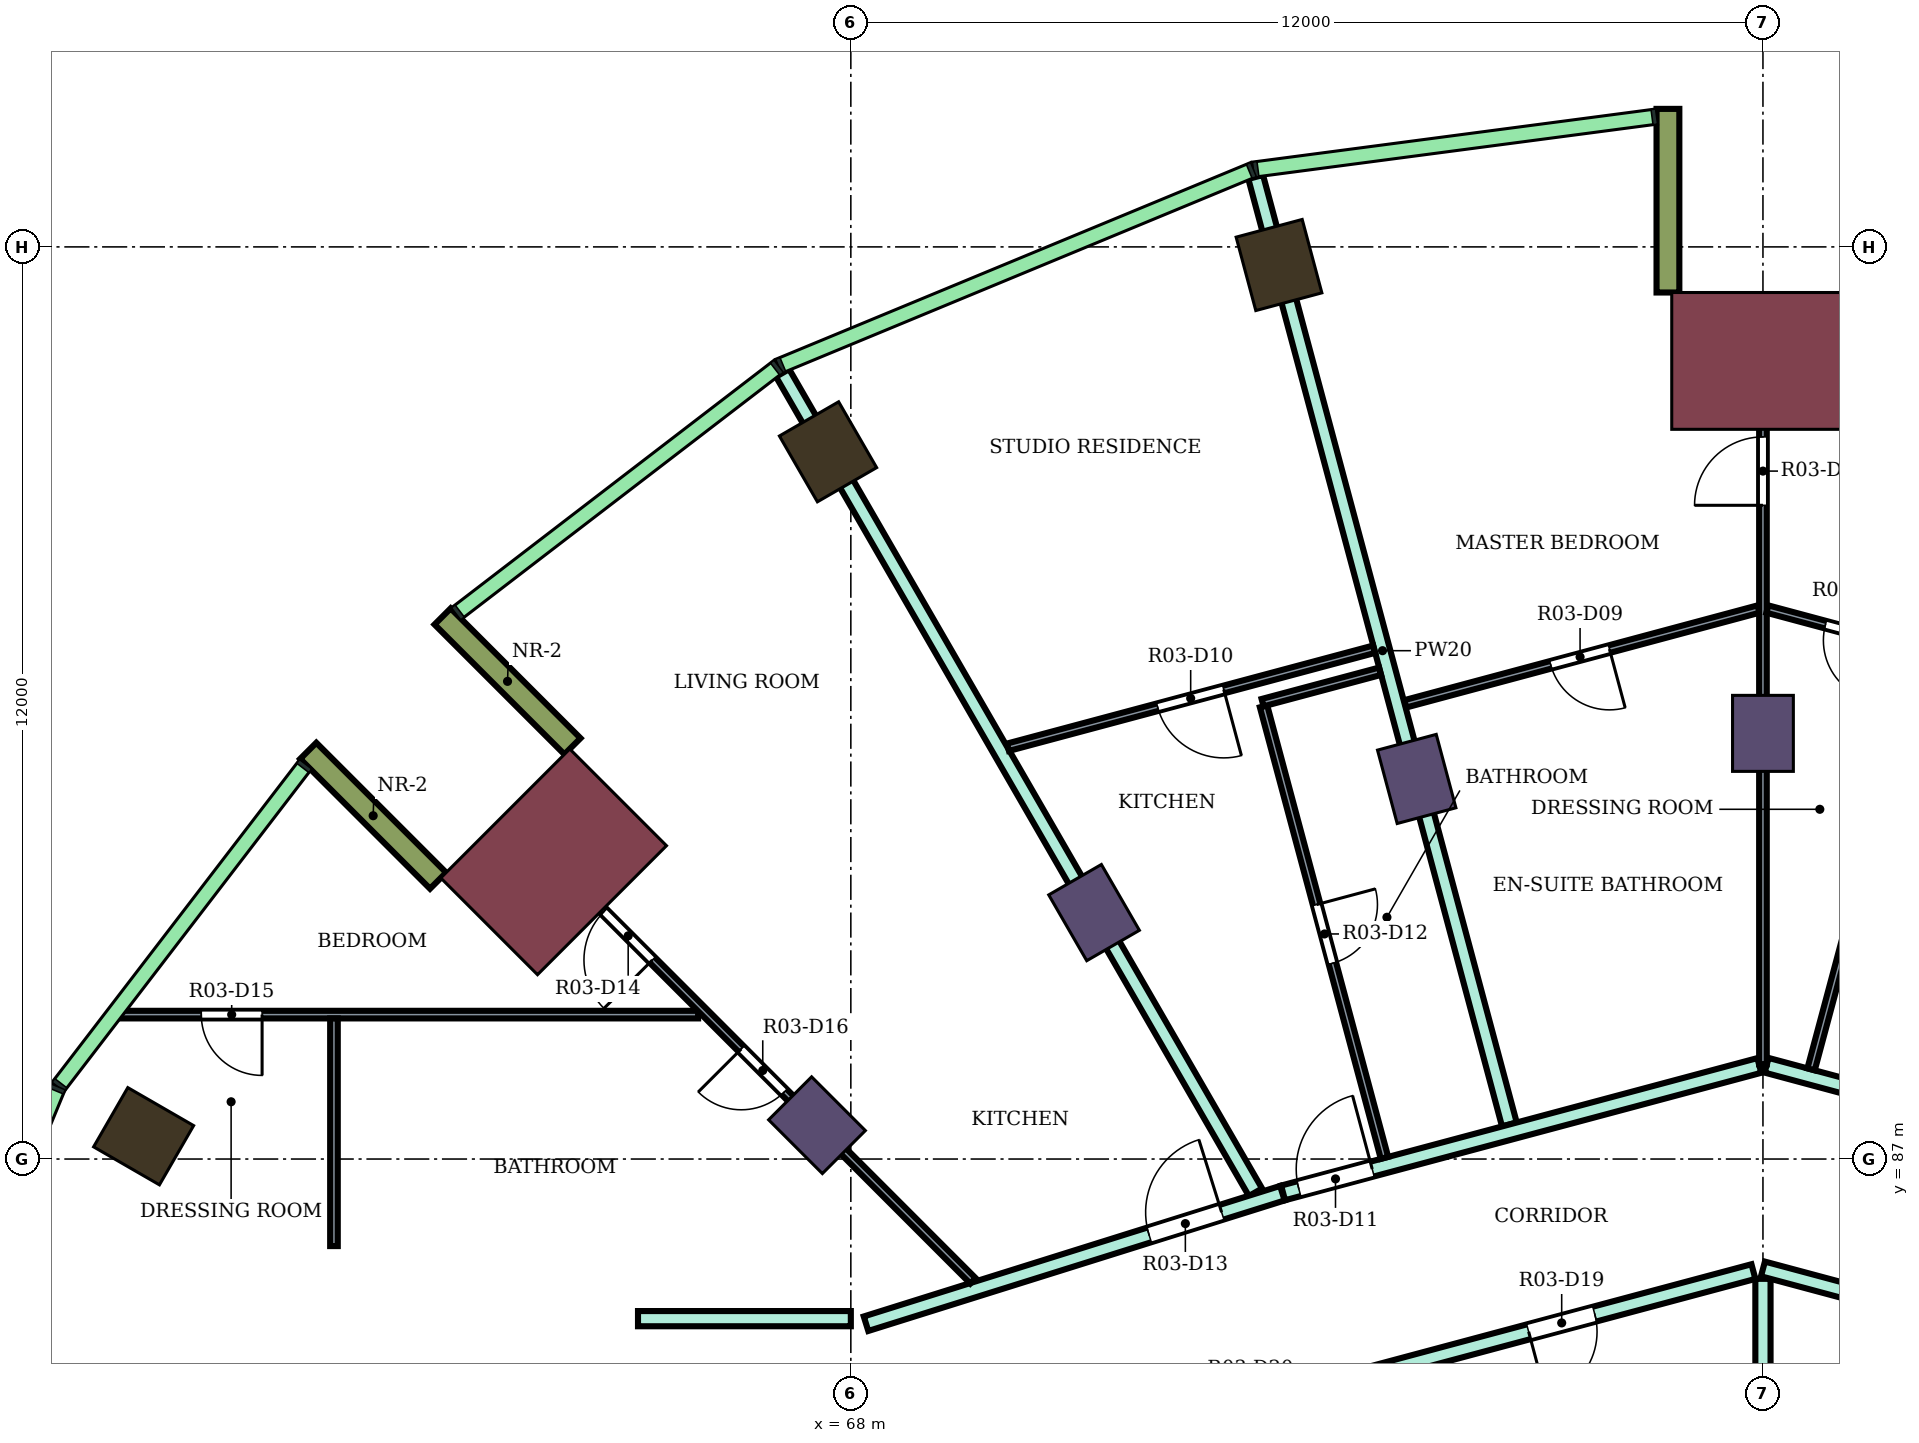
"""IFC4 building model, lengths in metres.
Left out: names, types, materials, properties, quantities, classifications, styles, units other than length and angle.
Written with IfcOpenShell. Run it as: python <this file> out.ifc"""

import sys

from ifc_helpers import new_model, si_unit, direction, frame, frame_2d, origin, origin_2d, place, context, subcontext, project, spatial, rectangle, extrude, element, fill, save


model = new_model("IFC4")
c1 = context("Model", 3, precision=1e-05, world=origin(), true_north=direction((0.0, 1.0)))
c2 = subcontext(c1, "Body", "Model", "MODEL_VIEW")
j1 = project(units=[si_unit("LENGTHUNIT", "METRE"), si_unit("PLANEANGLEUNIT", "RADIAN")], contexts=[c1])
p1 = place(None, origin())
s1 = spatial("IfcSite", under=j1, at=p1, CompositionType="ELEMENT")
p2 = place(p1, origin())
s2 = spatial("IfcBuilding", under=s1, at=p2, CompositionType="ELEMENT")
p3 = place(p2, frame((0.0, 0.0, 182.3)))
s3 = spatial("IfcBuildingStorey", under=s2, at=p3, CompositionType="ELEMENT", Elevation=182.3)
for number, where, z_axis, x_axis in (
    (1, (73.633, 98.762, 0.0), (0.0, 0.0, 1.0), (-0.259, 0.966, 0.0)),
    (2, (67.7, 96.304, 0.0), (0.0, 0.0, 1.0), (-0.5, 0.866, 0.0)),
    (3, (58.696, 87.3, 0.0), (0.0, 0.0, 1.0), (-0.866, 0.5, 0.0)),
):
    element("IfcColumn", number, at=place(p3, frame(where, z_axis=z_axis, x_axis=x_axis)), inside=s3, PredefinedType="COLUMN", context=c2, shape_type="SweptSolid", body=[
        extrude(rectangle(XDim=1.0, YDim=0.9, at=origin_2d()), origin(), (0.0, 0.0, 1.0), 4.1),
    ])
for number, where, z_axis, x_axis in (
    (4, (80.0, 92.6, 0.0), (0.0, 0.0, 1.0), (0.0, 1.0, 0.0)),
    (5, (75.445, 92.0, 0.0), (0.0, 0.0, 1.0), (-0.259, 0.966, 0.0)),
    (6, (71.2, 90.242, 0.0), (0.0, 0.0, 1.0), (-0.5, 0.866, 0.0)),
    (7, (67.555, 87.445, 0.0), (0.0, 0.0, 1.0), (-0.707, 0.707, 0.0)),
):
    element("IfcColumn", number, at=place(p3, frame(where, z_axis=z_axis, x_axis=x_axis)), inside=s3, PredefinedType="COLUMN", context=c2, shape_type="SweptSolid", body=[
        extrude(rectangle(XDim=1.0, YDim=0.8, at=origin_2d()), origin(), (0.0, 0.0, 1.0), 4.1),
    ])
for number, where, z_axis, x_axis in (
    (8, (80.0, 97.5, 0.0), (0.0, 0.0, 1.0), (0.0, 1.0, 0.0)),
    (9, (64.09, 90.91, 0.0), (0.0, 0.0, 1.0), (-0.707, 0.707, 0.0)),
):
    element("IfcColumn", number, at=place(p3, frame(where, z_axis=z_axis, x_axis=x_axis)), inside=s3, PredefinedType="COLUMN", context=c2, shape_type="SweptSolid", body=[
        extrude(rectangle(XDim=1.8, YDim=2.4, at=origin_2d()), origin(), (0.0, 0.0, 1.0), 4.1),
    ])
for number, where, z_axis, x_axis in (
    (10, (78.75, 98.4, 0.0), (0.0, 0.0, 1.0), (0.0, 1.0, 0.0)),
    (11, (64.338, 92.43, 0.0), (0.0, 0.0, 1.0), (-0.707, 0.707, 0.0)),
    (12, (62.57, 90.662, 0.0), (0.0, 0.0, 1.0), (-0.707, 0.707, 0.0)),
):
    element("IfcWall", number, at=place(p3, frame(where, z_axis=z_axis, x_axis=x_axis)), inside=s3, PredefinedType="NOTDEFINED", context=c2, shape_type="SweptSolid", body=[
        extrude(rectangle(XDim=2.416, YDim=0.3, at=frame_2d((1.208, 0.0))), origin(), (0.0, 0.0, 1.0), 4.1),
    ])
p4 = place(p3, frame((65.2, 84.9, 0.0), z_axis=(0.0, 0.0, 1.0), x_axis=(1.0, 0.0, 0.0)))
e13 = element("IfcWall", 13, at=p4, inside=s3, PredefinedType="PARTITIONING", context=c2, shape_type="SweptSolid", body=[
    extrude(rectangle(XDim=2.8, YDim=0.2, at=frame_2d((1.4, 0.0))), origin(), (0.0, 0.0, 1.0), 3.65),
])
p5 = place(p3, frame((67.102, 97.342, 0.0), z_axis=(0.0, 0.0, 1.0), x_axis=(0.499940938316, -0.866059500378, 0.0)))
e14 = element("IfcWall", 14, at=p5, inside=s3, PredefinedType="PARTITIONING", context=c2, shape_type="SweptSolid", body=[
    extrude(rectangle(XDim=12.446, YDim=0.2, at=frame_2d((6.223, 0.0))), origin(), (0.0, 0.0, 1.0), 3.65),
])
p6 = place(p3, frame((68.2, 84.833, 0.0), z_axis=(0.0, 0.0, 1.0), x_axis=(0.954204109499, 0.299156342762, 0.0)))
e15 = element("IfcWall", 15, at=p6, inside=s3, PredefinedType="PARTITIONING", context=c2, shape_type="SweptSolid", body=[
    extrude(rectangle(XDim=5.74, YDim=0.2, at=frame_2d((2.87, 0.0))), origin(), (0.0, 0.0, 1.0), 3.65),
])
p7 = place(p6, frame((3.903, 0.0, 0.0)))
e16 = element("IfcOpeningElement", 16, at=p7, cuts=e15, PredefinedType="OPENING", context=c2, shape_type="SweptSolid", body=[
    extrude(rectangle(XDim=1.0, YDim=2.1, at=frame_2d((0.5, 1.05))), frame((0.0, 0.11, 0.0), z_axis=(0.0, -1.0, 0.0), x_axis=(1.0, 0.0, 0.0)), (0.0, 0.0, 1.0), 0.22),
])
p8 = place(p3, frame((73.326, 99.92, 0.0), z_axis=(0.0, 0.0, 1.0), x_axis=(0.258652861824, -0.965970339643, 0.0)))
e17 = element("IfcWall", 17, at=p8, inside=s3, PredefinedType="PARTITIONING", context=c2, shape_type="SweptSolid", body=[
    extrude(rectangle(XDim=12.904, YDim=0.2, at=frame_2d((6.452, 0.0))), origin(), (0.0, 0.0, 1.0), 3.65),
])
p9 = place(p3, frame((73.687, 86.554, 0.0), z_axis=(0.0, 0.0, 1.0), x_axis=(0.965992724769, 0.258569247387, 0.0)))
e18 = element("IfcWall", 18, at=p9, inside=s3, PredefinedType="PARTITIONING", context=c2, shape_type="SweptSolid", body=[
    extrude(rectangle(XDim=6.486, YDim=0.2, at=frame_2d((3.243, 0.0))), origin(), (0.0, 0.0, 1.0), 3.65),
])
p10 = place(p9, frame((0.214, 0.0, 0.0)))
e19 = element("IfcOpeningElement", 19, at=p10, cuts=e18, PredefinedType="OPENING", context=c2, shape_type="SweptSolid", body=[
    extrude(rectangle(XDim=1.0, YDim=2.1, at=frame_2d((0.5, 1.05))), frame((0.0, 0.11, 0.0), z_axis=(0.0, -1.0, 0.0), x_axis=(1.0, 0.0, 0.0)), (0.0, 0.0, 1.0), 0.22),
])
p11 = place(p3, frame((74.413, 84.057, 0.0), z_axis=(0.0, 0.0, 1.0), x_axis=(0.965972135939, 0.258646153246, 0.0)))
e20 = element("IfcWall", 20, at=p11, inside=s3, PredefinedType="PARTITIONING", context=c2, shape_type="SweptSolid", body=[
    extrude(rectangle(XDim=5.654, YDim=0.2, at=frame_2d((2.827, 0.0))), origin(), (0.0, 0.0, 1.0), 3.65),
])
p12 = place(p11, frame((2.593, 0.0, 0.0)))
e21 = element("IfcOpeningElement", 21, at=p12, cuts=e20, PredefinedType="OPENING", context=c2, shape_type="SweptSolid", body=[
    extrude(rectangle(XDim=0.9, YDim=2.1, at=frame_2d((0.45, 1.05))), frame((0.0, 0.11, 0.0), z_axis=(0.0, -1.0, 0.0), x_axis=(1.0, 0.0, 0.0)), (0.0, 0.0, 1.0), 0.22),
])
p13 = place(p3, frame((80.0, 82.699, 0.0), z_axis=(0.0, 0.0, 1.0), x_axis=(0.0, 1.0, 0.0)))
e22 = element("IfcWall", 22, at=p13, inside=s3, PredefinedType="PARTITIONING", context=c2, shape_type="SweptSolid", body=[
    extrude(rectangle(XDim=2.725, YDim=0.2, at=frame_2d((1.363, 0.0))), origin(), (0.0, 0.0, 1.0), 3.65),
])
p14 = place(p3, frame((80.0, 85.554, 0.0), z_axis=(0.0, 0.0, 1.0), x_axis=(0.965928989968, -0.258807237802, 0.0)))
e23 = element("IfcWall", 23, at=p14, inside=s3, PredefinedType="PARTITIONING", context=c2, shape_type="SweptSolid", body=[
    extrude(rectangle(XDim=5.774, YDim=0.2, at=frame_2d((2.887, 0.0))), origin(), (0.0, 0.0, 1.0), 3.65),
])
p15 = place(p14, frame((2.292, 0.0, 0.0)))
e24 = element("IfcOpeningElement", 24, at=p15, cuts=e23, PredefinedType="OPENING", context=c2, shape_type="SweptSolid", body=[
    extrude(rectangle(XDim=0.9, YDim=2.1, at=frame_2d((0.45, 1.05))), frame((0.0, 0.11, 0.0), z_axis=(0.0, -1.0, 0.0), x_axis=(1.0, 0.0, 0.0)), (0.0, 0.0, 1.0), 0.22),
])
p16 = place(p3, frame((80.048, 88.233, 0.0), z_axis=(0.0, 0.0, 1.0), x_axis=(0.965787353661, -0.259335280109, 0.0)))
e25 = element("IfcWall", 25, at=p16, inside=s3, PredefinedType="PARTITIONING", context=c2, shape_type="SweptSolid", body=[
    extrude(rectangle(XDim=6.476, YDim=0.2, at=frame_2d((3.238, 0.0))), origin(), (0.0, 0.0, 1.0), 3.65),
])
p17 = place(p16, frame((4.936, 0.0, 0.0)))
e26 = element("IfcOpeningElement", 26, at=p17, cuts=e25, PredefinedType="OPENING", context=c2, shape_type="SweptSolid", body=[
    extrude(rectangle(XDim=1.0, YDim=2.1, at=frame_2d((0.5, 1.05))), frame((0.0, 0.11, 0.0), z_axis=(0.0, -1.0, 0.0), x_axis=(1.0, 0.0, 0.0)), (0.0, 0.0, 1.0), 0.22),
])
p18 = place(p3, frame((58.379, 88.9, 0.0), z_axis=(0.0, 0.0, 1.0), x_axis=(1.0, 0.0, 0.0)))
e27 = element("IfcWall", 27, at=p18, inside=s3, PredefinedType="PARTITIONING", context=c2, shape_type="SweptSolid", body=[
    extrude(rectangle(XDim=7.612, YDim=0.1, at=frame_2d((3.806, 0.0))), origin(), (0.0, 0.0, 1.0), 3.65),
])
p19 = place(p18, frame((1.075, 0.0, 0.0)))
e28 = element("IfcOpeningElement", 28, at=p19, cuts=e27, PredefinedType="OPENING", context=c2, shape_type="SweptSolid", body=[
    extrude(rectangle(XDim=0.8, YDim=2.1, at=frame_2d((0.4, 1.05))), frame((0.0, 0.06, 0.0), z_axis=(0.0, -1.0, 0.0), x_axis=(1.0, 0.0, 0.0)), (0.0, 0.0, 1.0), 0.12),
])
p20 = place(p3, frame((61.2, 85.855, 0.0), z_axis=(0.0, 0.0, 1.0), x_axis=(0.0, 1.0, 0.0)))
e29 = element("IfcWall", 29, at=p20, inside=s3, PredefinedType="PARTITIONING", context=c2, shape_type="SweptSolid", body=[
    extrude(rectangle(XDim=2.995, YDim=0.1, at=frame_2d((1.498, 0.0))), origin(), (0.0, 0.0, 1.0), 3.65),
])
p21 = place(p3, frame((63.599, 91.409, 0.0), z_axis=(0.0, 0.0, 1.0), x_axis=(0.706920044618, -0.707293468453, 0.0)))
e30 = element("IfcWall", 30, at=p21, inside=s3, PredefinedType="PARTITIONING", context=c2, shape_type="SweptSolid", body=[
    extrude(rectangle(XDim=8.499, YDim=0.1, at=frame_2d((4.25, 0.0))), origin(), (0.0, 0.0, 1.0), 3.65),
])
p22 = place(p21, frame((1.632, 0.0, 0.0)))
e31 = element("IfcOpeningElement", 31, at=p22, cuts=e30, PredefinedType="OPENING", context=c2, shape_type="SweptSolid", body=[
    extrude(rectangle(XDim=0.9, YDim=2.1, at=frame_2d((0.45, 1.05))), frame((0.0, 0.06, 0.0), z_axis=(0.0, -1.0, 0.0), x_axis=(1.0, 0.0, 0.0)), (0.0, 0.0, 1.0), 0.12),
])
p23 = place(p21, frame((4.186, 0.0, 0.0)))
e32 = element("IfcOpeningElement", 32, at=p23, cuts=e30, PredefinedType="OPENING", context=c2, shape_type="SweptSolid", body=[
    extrude(rectangle(XDim=0.8, YDim=2.1, at=frame_2d((0.4, 1.05))), frame((0.0, 0.06, 0.0), z_axis=(0.0, -1.0, 0.0), x_axis=(1.0, 0.0, 0.0)), (0.0, 0.0, 1.0), 0.12),
])
p24 = place(p3, frame((70.067, 92.417, 0.0), z_axis=(0.0, 0.0, 1.0), x_axis=(0.965982566978, 0.258607193045, 0.0)))
e33 = element("IfcWall", 33, at=p24, inside=s3, PredefinedType="PARTITIONING", context=c2, shape_type="SweptSolid", body=[
    extrude(rectangle(XDim=4.987, YDim=0.1, at=frame_2d((2.493, 0.0))), origin(), (0.0, 0.0, 1.0), 3.65),
])
p25 = place(p24, frame((2.038, 0.0, 0.0)))
e34 = element("IfcOpeningElement", 34, at=p25, cuts=e33, PredefinedType="OPENING", context=c2, shape_type="SweptSolid", body=[
    extrude(rectangle(XDim=0.9, YDim=2.1, at=frame_2d((0.45, 1.05))), frame((0.0, 0.06, 0.0), z_axis=(0.0, -1.0, 0.0), x_axis=(1.0, 0.0, 0.0)), (0.0, 0.0, 1.0), 0.12),
])
p26 = place(p3, frame((73.43, 92.956, 0.0), z_axis=(0.0, 0.0, 1.0), x_axis=(0.258707643808, -0.965955669291, 0.0)))
e35 = element("IfcWall", 35, at=p26, inside=s3, PredefinedType="PARTITIONING", context=c2, shape_type="SweptSolid", body=[
    extrude(rectangle(XDim=6.15, YDim=0.1, at=frame_2d((3.075, 0.0))), origin(), (0.0, 0.0, 1.0), 3.65),
])
p27 = place(p26, frame((2.7, 0.0, 0.0)))
e36 = element("IfcOpeningElement", 36, at=p27, cuts=e35, PredefinedType="OPENING", context=c2, shape_type="SweptSolid", body=[
    extrude(rectangle(XDim=0.8, YDim=2.1, at=frame_2d((0.4, 1.05))), frame((0.0, 0.06, 0.0), z_axis=(0.0, -1.0, 0.0), x_axis=(1.0, 0.0, 0.0)), (0.0, 0.0, 1.0), 0.12),
])
p28 = place(p3, frame((73.417, 93.004, 0.0), z_axis=(0.0, 0.0, 1.0), x_axis=(0.966062421459, 0.258308725839, 0.0)))
e37 = element("IfcWall", 37, at=p28, inside=s3, PredefinedType="PARTITIONING", context=c2, shape_type="SweptSolid", body=[
    extrude(rectangle(XDim=1.599, YDim=0.1, at=frame_2d((0.8, 0.0))), origin(), (0.0, 0.0, 1.0), 3.65),
])
p29 = place(p3, frame((75.295, 92.989, 0.0), z_axis=(0.0, 0.0, 1.0), x_axis=(0.965829517501, 0.259178207271, 0.0)))
e38 = element("IfcWall", 38, at=p29, inside=s3, PredefinedType="PARTITIONING", context=c2, shape_type="SweptSolid", body=[
    extrude(rectangle(XDim=4.812, YDim=0.1, at=frame_2d((2.406, 0.0))), origin(), (0.0, 0.0, 1.0), 3.65),
])
p30 = place(p29, frame((1.981, 0.0, 0.0)))
e39 = element("IfcOpeningElement", 39, at=p30, cuts=e38, PredefinedType="OPENING", context=c2, shape_type="SweptSolid", body=[
    extrude(rectangle(XDim=0.8, YDim=2.1, at=frame_2d((0.4, 1.05))), frame((0.0, 0.06, 0.0), z_axis=(0.0, -1.0, 0.0), x_axis=(1.0, 0.0, 0.0)), (0.0, 0.0, 1.0), 0.12),
])
p31 = place(p3, frame((80.0, 88.246, 0.0), z_axis=(0.0, 0.0, 1.0), x_axis=(0.0, 1.0, 0.0)))
e40 = element("IfcWall", 40, at=p31, inside=s3, PredefinedType="PARTITIONING", context=c2, shape_type="SweptSolid", body=[
    extrude(rectangle(XDim=9.954, YDim=0.1, at=frame_2d((4.977, 0.0))), origin(), (0.0, 0.0, 1.0), 3.65),
])
p32 = place(p31, frame((7.354, 0.0, 0.0)))
e41 = element("IfcOpeningElement", 41, at=p32, cuts=e40, PredefinedType="OPENING", context=c2, shape_type="SweptSolid", body=[
    extrude(rectangle(XDim=0.9, YDim=2.1, at=frame_2d((0.45, 1.05))), frame((0.0, 0.06, 0.0), z_axis=(0.0, -1.0, 0.0), x_axis=(1.0, 0.0, 0.0)), (0.0, 0.0, 1.0), 0.12),
])
p33 = place(p3, frame((80.058, 94.235, 0.0), z_axis=(0.0, 0.0, 1.0), x_axis=(0.965831212389, -0.259171891173, 0.0)))
e42 = element("IfcWall", 42, at=p33, inside=s3, PredefinedType="PARTITIONING", context=c2, shape_type="SweptSolid", body=[
    extrude(rectangle(XDim=4.872, YDim=0.1, at=frame_2d((2.436, 0.0))), origin(), (0.0, 0.0, 1.0), 3.65),
])
p34 = place(p33, frame((0.792, 0.0, 0.0)))
e43 = element("IfcOpeningElement", 43, at=p34, cuts=e42, PredefinedType="OPENING", context=c2, shape_type="SweptSolid", body=[
    extrude(rectangle(XDim=0.8, YDim=2.1, at=frame_2d((0.4, 1.05))), frame((0.0, 0.06, 0.0), z_axis=(0.0, -1.0, 0.0), x_axis=(1.0, 0.0, 0.0)), (0.0, 0.0, 1.0), 0.12),
])
p35 = place(p3, frame((80.633, 88.18, 0.0), z_axis=(0.0, 0.0, 1.0), x_axis=(0.25898304477, 0.965881867788, 0.0)))
e44 = element("IfcWall", 44, at=p35, inside=s3, PredefinedType="PARTITIONING", context=c2, shape_type="SweptSolid", body=[
    extrude(rectangle(XDim=5.65, YDim=0.1, at=frame_2d((2.825, 0.0))), origin(), (0.0, 0.0, 1.0), 3.65),
])
p36 = place(p34, frame((0.8, 0.0, 0.0), z_axis=(0.0, 0.0, 1.0), x_axis=(-1.0, 0.0, 0.0)))
e45 = element("IfcDoor", 45, at=p36, inside=s3, OperationType="SINGLE_SWING_LEFT", PredefinedType="DOOR", context=c2, shape_type="SweptSolid", body=[
    extrude(rectangle(XDim=0.8, YDim=2.1, at=frame_2d((0.4, 1.05))), frame((0.0, 0.025, 0.0), z_axis=(0.0, -1.0, 0.0), x_axis=(1.0, 0.0, 0.0)), (0.0, 0.0, 1.0), 0.05),
])
fill(e43, e45)
p37 = place(p32, origin())
e46 = element("IfcDoor", 46, at=p37, inside=s3, OperationType="SINGLE_SWING_LEFT", PredefinedType="DOOR", context=c2, shape_type="SweptSolid", body=[
    extrude(rectangle(XDim=0.9, YDim=2.1, at=frame_2d((0.45, 1.05))), frame((0.0, 0.025, 0.0), z_axis=(0.0, -1.0, 0.0), x_axis=(1.0, 0.0, 0.0)), (0.0, 0.0, 1.0), 0.05),
])
fill(e41, e46)
p38 = place(p30, frame((0.8, 0.0, 0.0), z_axis=(0.0, 0.0, 1.0), x_axis=(-1.0, 0.0, 0.0)))
e47 = element("IfcDoor", 47, at=p38, inside=s3, OperationType="SINGLE_SWING_LEFT", PredefinedType="DOOR", context=c2, shape_type="SweptSolid", body=[
    extrude(rectangle(XDim=0.8, YDim=2.1, at=frame_2d((0.4, 1.05))), frame((0.0, 0.025, 0.0), z_axis=(0.0, -1.0, 0.0), x_axis=(1.0, 0.0, 0.0)), (0.0, 0.0, 1.0), 0.05),
])
fill(e39, e47)
p39 = place(p25, frame((0.9, 0.0, 0.0), z_axis=(0.0, 0.0, 1.0), x_axis=(-1.0, 0.0, 0.0)))
e48 = element("IfcDoor", 48, at=p39, inside=s3, OperationType="SINGLE_SWING_LEFT", PredefinedType="DOOR", context=c2, shape_type="SweptSolid", body=[
    extrude(rectangle(XDim=0.9, YDim=2.1, at=frame_2d((0.45, 1.05))), frame((0.0, 0.025, 0.0), z_axis=(0.0, -1.0, 0.0), x_axis=(1.0, 0.0, 0.0)), (0.0, 0.0, 1.0), 0.05),
])
fill(e34, e48)
p40 = place(p10, origin())
e49 = element("IfcDoor", 49, at=p40, inside=s3, OperationType="SINGLE_SWING_RIGHT", PredefinedType="DOOR", context=c2, shape_type="SweptSolid", body=[
    extrude(rectangle(XDim=1.0, YDim=2.1, at=frame_2d((0.5, 1.05))), frame((0.0, 0.025, 0.0), z_axis=(0.0, -1.0, 0.0), x_axis=(1.0, 0.0, 0.0)), (0.0, 0.0, 1.0), 0.05),
])
fill(e19, e49)
p41 = place(p27, origin())
e50 = element("IfcDoor", 50, at=p41, inside=s3, OperationType="SINGLE_SWING_LEFT", PredefinedType="DOOR", context=c2, shape_type="SweptSolid", body=[
    extrude(rectangle(XDim=0.8, YDim=2.1, at=frame_2d((0.4, 1.05))), frame((0.0, 0.025, 0.0), z_axis=(0.0, -1.0, 0.0), x_axis=(1.0, 0.0, 0.0)), (0.0, 0.0, 1.0), 0.05),
])
fill(e36, e50)
p42 = place(p7, origin())
e51 = element("IfcDoor", 51, at=p42, inside=s3, OperationType="SINGLE_SWING_RIGHT", PredefinedType="DOOR", context=c2, shape_type="SweptSolid", body=[
    extrude(rectangle(XDim=1.0, YDim=2.1, at=frame_2d((0.5, 1.05))), frame((0.0, 0.025, 0.0), z_axis=(0.0, -1.0, 0.0), x_axis=(1.0, 0.0, 0.0)), (0.0, 0.0, 1.0), 0.05),
])
fill(e16, e51)
p43 = place(p22, frame((0.9, 0.0, 0.0), z_axis=(0.0, 0.0, 1.0), x_axis=(-1.0, 0.0, 0.0)))
e52 = element("IfcDoor", 52, at=p43, inside=s3, OperationType="SINGLE_SWING_LEFT", PredefinedType="DOOR", context=c2, shape_type="SweptSolid", body=[
    extrude(rectangle(XDim=0.9, YDim=2.1, at=frame_2d((0.45, 1.05))), frame((0.0, 0.025, 0.0), z_axis=(0.0, -1.0, 0.0), x_axis=(1.0, 0.0, 0.0)), (0.0, 0.0, 1.0), 0.05),
])
fill(e31, e52)
p44 = place(p19, frame((0.8, 0.0, 0.0), z_axis=(0.0, 0.0, 1.0), x_axis=(-1.0, 0.0, 0.0)))
e53 = element("IfcDoor", 53, at=p44, inside=s3, OperationType="SINGLE_SWING_LEFT", PredefinedType="DOOR", context=c2, shape_type="SweptSolid", body=[
    extrude(rectangle(XDim=0.8, YDim=2.1, at=frame_2d((0.4, 1.05))), frame((0.0, 0.025, 0.0), z_axis=(0.0, -1.0, 0.0), x_axis=(1.0, 0.0, 0.0)), (0.0, 0.0, 1.0), 0.05),
])
fill(e28, e53)
p45 = place(p23, frame((0.8, 0.0, 0.0), z_axis=(0.0, 0.0, 1.0), x_axis=(-1.0, 0.0, 0.0)))
e54 = element("IfcDoor", 54, at=p45, inside=s3, OperationType="SINGLE_SWING_RIGHT", PredefinedType="DOOR", context=c2, shape_type="SweptSolid", body=[
    extrude(rectangle(XDim=0.8, YDim=2.1, at=frame_2d((0.4, 1.05))), frame((0.0, 0.025, 0.0), z_axis=(0.0, -1.0, 0.0), x_axis=(1.0, 0.0, 0.0)), (0.0, 0.0, 1.0), 0.05),
])
fill(e32, e54)
p46 = place(p12, frame((0.9, 0.0, 0.0), z_axis=(0.0, 0.0, 1.0), x_axis=(-1.0, 0.0, 0.0)))
e55 = element("IfcDoor", 55, at=p46, inside=s3, OperationType="SINGLE_SWING_RIGHT", PredefinedType="DOOR", context=c2, shape_type="SweptSolid", body=[
    extrude(rectangle(XDim=0.9, YDim=2.1, at=frame_2d((0.45, 1.05))), frame((0.0, 0.025, 0.0), z_axis=(0.0, -1.0, 0.0), x_axis=(1.0, 0.0, 0.0)), (0.0, 0.0, 1.0), 0.05),
])
fill(e21, e55)
save(model, sys.argv[1])
